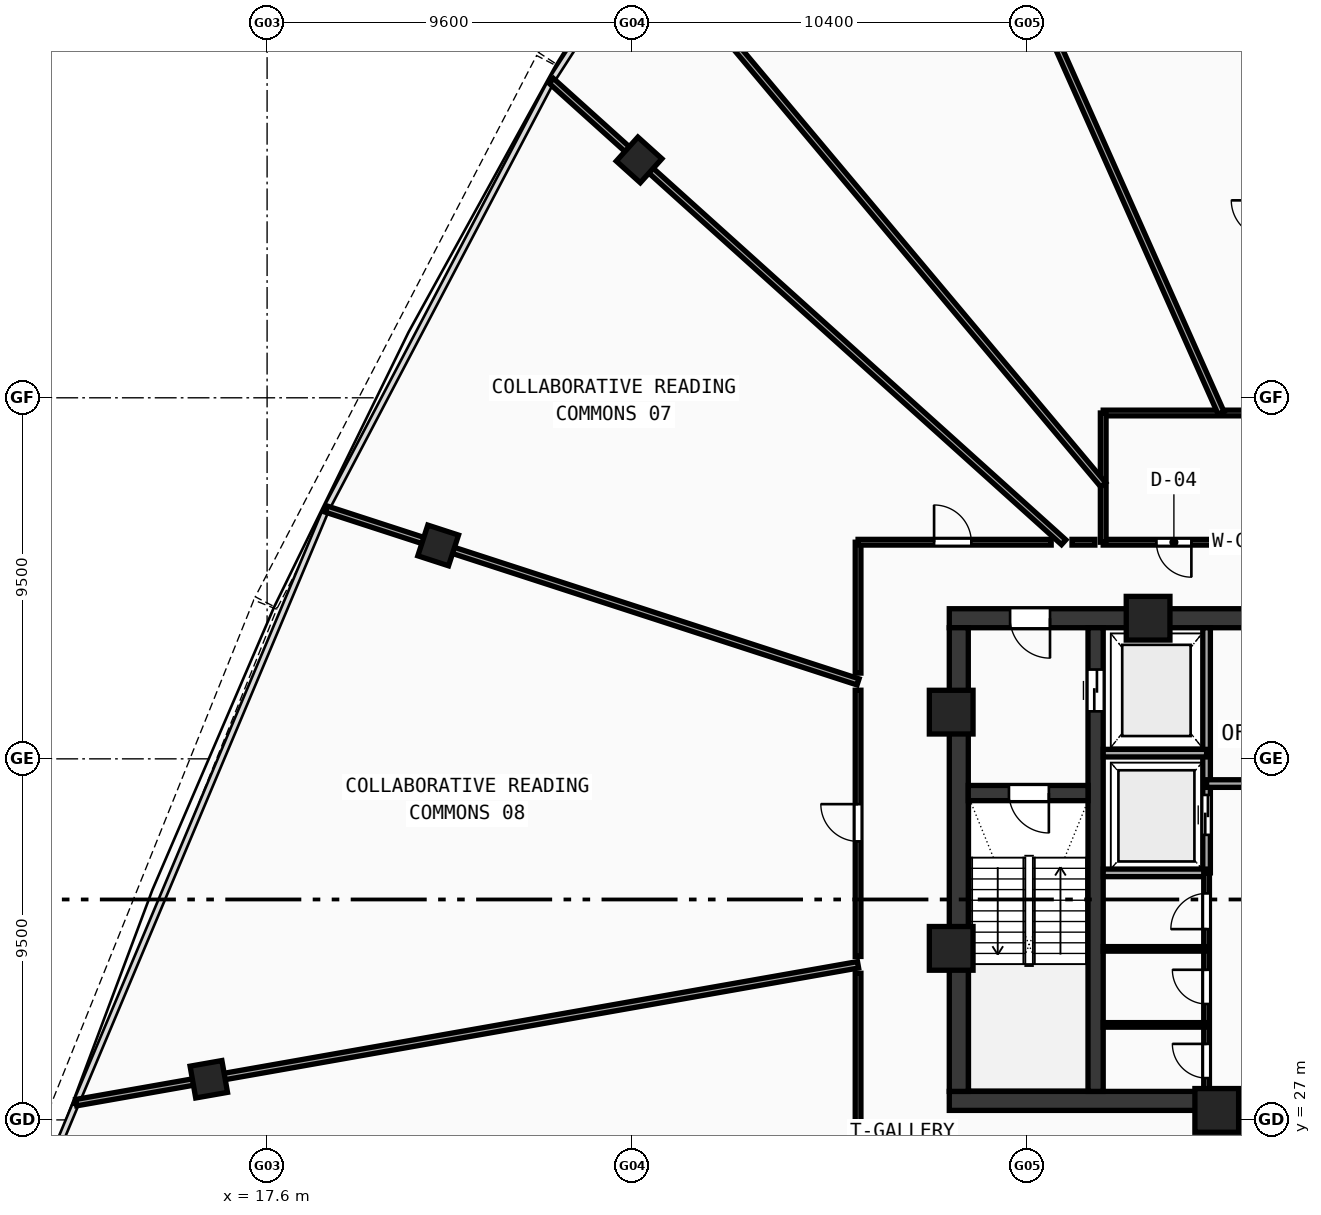
"""IFC4 building model, lengths in metres.
Left out: names, types, materials, properties, quantities, classifications, styles, units other than length and angle.
Written with IfcOpenShell. Run it as: python <this file> out.ifc"""

import sys

from ifc_helpers import new_model, si_unit, direction, frame, frame_2d, origin, origin_with_axes, origin_2d, place, context, subcontext, project, spatial, rectangle, hollow_rectangle, extrude, source, transform, mapped, element, fill, save


model = new_model("IFC4")
c1 = context("Model", 3, precision=1e-05, world=origin(), true_north=direction((0.0, 1.0)))
c2 = subcontext(c1, "Body", "Model", "MODEL_VIEW")
j1 = project(units=[si_unit("LENGTHUNIT", "METRE"), si_unit("PLANEANGLEUNIT", "RADIAN")], contexts=[c1])
p1 = place(None, origin())
s1 = spatial("IfcSite", under=j1, at=p1, CompositionType="ELEMENT")
p2 = place(p1, origin())
s2 = spatial("IfcBuilding", under=s1, at=p2, CompositionType="ELEMENT")
p3 = place(p2, frame((0.0, 0.0, 233.34)))
s3 = spatial("IfcBuildingStorey", under=s2, at=p3, CompositionType="ELEMENT", Elevation=233.34)
p4 = place(p3, frame((35.55, 27.5, 0.0), z_axis=(0.0, 0.0, 1.0), x_axis=(1.0, 0.0, 0.0)))
e1 = element("IfcWall", 1, at=p4, inside=s3, PredefinedType="SHEAR", context=c2, shape_type="SweptSolid", body=[
    extrude(rectangle(XDim=24.9, YDim=0.5, at=frame_2d((12.45, 0.0))), origin(), (0.0, 0.0, 1.0), 3.47),
])
p5 = place(p3, frame((35.55, 40.2, 0.0), z_axis=(0.0, 0.0, 1.0), x_axis=(1.0, 0.0, 0.0)))
e2 = element("IfcWall", 2, at=p5, inside=s3, PredefinedType="SHEAR", context=c2, shape_type="SweptSolid", body=[
    extrude(rectangle(XDim=11.25, YDim=0.5, at=frame_2d((5.625, 0.0))), origin(), (0.0, 0.0, 1.0), 3.47),
])
p6 = place(p5, frame((1.6, 0.0, 0.0)))
e3 = element("IfcOpeningElement", 3, at=p6, cuts=e2, PredefinedType="OPENING", context=c2, shape_type="SweptSolid", body=[
    extrude(rectangle(XDim=1.05, YDim=2.1, at=frame_2d((0.525, 1.05))), frame((0.0, 0.26, 0.0), z_axis=(0.0, -1.0, 0.0), x_axis=(1.0, 0.0, 0.0)), (0.0, 0.0, 1.0), 0.52),
])
p7 = place(p3, frame((35.8, 27.75, 0.0), z_axis=(0.0, 0.0, 1.0), x_axis=(0.0, 1.0, 0.0)))
e4 = element("IfcWall", 4, at=p7, inside=s3, PredefinedType="SHEAR", context=c2, shape_type="SweptSolid", body=[
    extrude(rectangle(XDim=12.2, YDim=0.5, at=frame_2d((6.1, 0.0))), origin(), (0.0, 0.0, 1.0), 3.47),
])
p8 = place(p3, frame((39.4, 27.75, 0.0), z_axis=(0.0, 0.0, 1.0), x_axis=(0.0, 1.0, 0.0)))
e5 = element("IfcWall", 5, at=p8, inside=s3, PredefinedType="SHEAR", context=c2, shape_type="SweptSolid", body=[
    extrude(rectangle(XDim=12.2, YDim=0.4, at=frame_2d((6.1, 0.0))), origin(), (0.0, 0.0, 1.0), 3.47),
])
p9 = place(p8, frame((10.0, 0.0, 0.0)))
e6 = element("IfcOpeningElement", 6, at=p9, cuts=e5, PredefinedType="OPENING", context=c2, shape_type="SweptSolid", body=[
    extrude(rectangle(XDim=1.1, YDim=2.1, at=frame_2d((0.55, 1.05))), frame((0.0, 0.21, 0.0), z_axis=(0.0, -1.0, 0.0), x_axis=(1.0, 0.0, 0.0)), (0.0, 0.0, 1.0), 0.42),
])
p10 = place(p3, frame((36.05, 35.6, 0.0), z_axis=(0.0, 0.0, 1.0), x_axis=(1.0, 0.0, 0.0)))
e7 = element("IfcWall", 7, at=p10, inside=s3, PredefinedType="SHEAR", context=c2, shape_type="SweptSolid", body=[
    extrude(rectangle(XDim=3.15, YDim=0.4, at=frame_2d((1.575, 0.0))), origin(), (0.0, 0.0, 1.0), 3.47),
])
p11 = place(p10, frame((1.07, 0.0, 0.0)))
e8 = element("IfcOpeningElement", 8, at=p11, cuts=e7, PredefinedType="OPENING", context=c2, shape_type="SweptSolid", body=[
    extrude(rectangle(XDim=1.05, YDim=2.1, at=frame_2d((0.525, 1.05))), frame((0.0, 0.21, 0.0), z_axis=(0.0, -1.0, 0.0), x_axis=(1.0, 0.0, 0.0)), (0.0, 0.0, 1.0), 0.42),
])
m1 = source(origin(), c2, "Body", "SweptSolid", [
    extrude(hollow_rectangle(XDim=1.15, YDim=1.15, WallThickness=0.048, at=origin_2d()), origin(), (0.0, 0.0, 1.0), 3.73),
])
for number, where, z_axis, x_axis in (
    (9, (42.588, 27.25, -0.26), (0.0, 0.0, 1.0), (1.0, 0.0, 0.0)),
    (10, (40.781, 40.2, -0.26), (0.0, 0.0, 1.0), (1.0, 0.0, 0.0)),
    (11, (35.6, 37.729, -0.26), (0.0, 0.0, 1.0), (1.0, 0.0, 0.0)),
    (12, (35.6, 31.513, -0.26), (0.0, 0.0, 1.0), (1.0, 0.0, 0.0)),
):
    element("IfcColumn", number, at=place(p3, frame(where, z_axis=z_axis, x_axis=x_axis)), inside=s3, PredefinedType="COLUMN", context=c2, shape_type="MappedRepresentation", body=[
        mapped(m1, transform((0.0, 0.0, 0.0), scale=1.0)),
    ])
m2 = source(origin(), c2, "Body", "SweptSolid", [
    extrude(hollow_rectangle(XDim=0.85, YDim=0.85, WallThickness=0.034, at=origin_2d()), origin(), (0.0, 0.0, 1.0), 3.73),
])
for number, where, z_axis, x_axis in (
    (13, (27.388, 52.259, -0.26), (0.0, 0.0, 1.0), (-0.669, -0.743, 0.0)),
    (14, (22.102, 42.115, -0.26), (0.0, 0.0, 1.0), (-0.309, -0.951, 0.0)),
    (15, (16.066, 28.069, -0.26), (0.0, 0.0, 1.0), (0.174, -0.985, 0.0)),
):
    element("IfcColumn", number, at=place(p3, frame(where, z_axis=z_axis, x_axis=x_axis)), inside=s3, PredefinedType="COLUMN", context=c2, shape_type="MappedRepresentation", body=[
        mapped(m2, transform((0.0, 0.0, 0.0), scale=1.0)),
    ])
p12 = place(p3, frame((42.32, 33.5, 0.0), z_axis=(0.0, 0.0, 1.0), x_axis=(0.0, 1.0, 0.0)))
e16 = element("IfcWall", 16, at=p12, inside=s3, PredefinedType="SOLIDWALL", context=c2, shape_type="SweptSolid", body=[
    extrude(rectangle(XDim=6.45, YDim=0.2, at=frame_2d((3.225, 0.0))), origin(), (0.0, 0.0, 1.0), 3.47),
])
p13 = place(p12, frame((1.0, 0.0, 0.0)))
e17 = element("IfcOpeningElement", 17, at=p13, cuts=e16, PredefinedType="OPENING", context=c2, shape_type="SweptSolid", body=[
    extrude(rectangle(XDim=1.05, YDim=2.1, at=frame_2d((0.525, 1.05))), frame((0.0, 0.11, 0.0), z_axis=(0.0, -1.0, 0.0), x_axis=(1.0, 0.0, 0.0)), (0.0, 0.0, 1.0), 0.22),
])
for number, where, z_axis, x_axis in (
    (18, (39.6, 36.65, 0.0), (0.0, 0.0, 1.0), (1.0, 0.0, 0.0)),
    (19, (39.6, 33.5, 0.0), (0.0, 0.0, 1.0), (1.0, 0.0, 0.0)),
):
    element("IfcWall", number, at=place(p3, frame(where, z_axis=z_axis, x_axis=x_axis)), inside=s3, PredefinedType="SOLIDWALL", context=c2, shape_type="SweptSolid", body=[
        extrude(rectangle(XDim=2.72, YDim=0.2, at=frame_2d((1.36, 0.0))), origin(), (0.0, 0.0, 1.0), 3.47),
    ])
p14 = place(p3, frame((42.32, 35.85, 0.0), z_axis=(0.0, 0.0, 1.0), x_axis=(1.0, 0.0, 0.0)))
e20 = element("IfcWall", 20, at=p14, inside=s3, PredefinedType="SOLIDWALL", context=c2, shape_type="SweptSolid", body=[
    extrude(rectangle(XDim=4.73, YDim=0.2, at=frame_2d((2.365, 0.0))), origin(), (0.0, 0.0, 1.0), 3.47),
])
p15 = place(p14, frame((1.8, 0.0, 0.0)))
e21 = element("IfcOpeningElement", 21, at=p15, cuts=e20, PredefinedType="OPENING", context=c2, shape_type="SweptSolid", body=[
    extrude(rectangle(XDim=0.9, YDim=2.1, at=frame_2d((0.45, 1.05))), frame((0.0, 0.11, 0.0), z_axis=(0.0, -1.0, 0.0), x_axis=(1.0, 0.0, 0.0)), (0.0, 0.0, 1.0), 0.22),
])
p16 = place(p3, frame((42.32, 27.6, 0.0), z_axis=(0.0, 0.0, 1.0), x_axis=(0.0, 1.0, 0.0)))
e22 = element("IfcWall", 22, at=p16, inside=s3, PredefinedType="PARTITIONING", context=c2, shape_type="SweptSolid", body=[
    extrude(rectangle(XDim=5.9, YDim=0.15, at=frame_2d((2.95, 0.0))), origin(), (0.0, 0.0, 1.0), 3.47),
])
p17 = place(p16, frame((0.5, 0.0, 0.0)))
e23 = element("IfcOpeningElement", 23, at=p17, cuts=e22, PredefinedType="OPENING", context=c2, shape_type="SweptSolid", body=[
    extrude(rectangle(XDim=0.9, YDim=2.1, at=frame_2d((0.45, 1.05))), frame((0.0, 0.085, 0.0), z_axis=(0.0, -1.0, 0.0), x_axis=(1.0, 0.0, 0.0)), (0.0, 0.0, 1.0), 0.17),
])
p18 = place(p16, frame((2.45, 0.0, 0.0)))
e24 = element("IfcOpeningElement", 24, at=p18, cuts=e22, PredefinedType="OPENING", context=c2, shape_type="SweptSolid", body=[
    extrude(rectangle(XDim=0.9, YDim=2.1, at=frame_2d((0.45, 1.05))), frame((0.0, 0.085, 0.0), z_axis=(0.0, -1.0, 0.0), x_axis=(1.0, 0.0, 0.0)), (0.0, 0.0, 1.0), 0.17),
])
p19 = place(p16, frame((4.42, 0.0, 0.0)))
e25 = element("IfcOpeningElement", 25, at=p19, cuts=e22, PredefinedType="OPENING", context=c2, shape_type="SweptSolid", body=[
    extrude(rectangle(XDim=0.94, YDim=2.1, at=frame_2d((0.47, 1.05))), frame((0.0, 0.085, 0.0), z_axis=(0.0, -1.0, 0.0), x_axis=(1.0, 0.0, 0.0)), (0.0, 0.0, 1.0), 0.17),
])
for number, where, z_axis, x_axis in (
    (26, (39.6, 29.5, 0.0), (0.0, 0.0, 1.0), (1.0, 0.0, 0.0)),
    (27, (39.6, 31.5, 0.0), (0.0, 0.0, 1.0), (1.0, 0.0, 0.0)),
):
    element("IfcWall", number, at=place(p3, frame(where, z_axis=z_axis, x_axis=x_axis)), inside=s3, PredefinedType="PARTITIONING", context=c2, shape_type="SweptSolid", body=[
        extrude(rectangle(XDim=2.72, YDim=0.12, at=frame_2d((1.36, 0.0))), origin(), (0.0, 0.0, 1.0), 3.47),
    ])
p20 = place(p3, frame((39.6, 42.2, 0.0), z_axis=(0.0, 0.0, 1.0), x_axis=(1.0, 0.0, 0.0)))
e28 = element("IfcWall", 28, at=p20, inside=s3, PredefinedType="PARTITIONING", context=c2, shape_type="SweptSolid", body=[
    extrude(rectangle(XDim=4.35, YDim=0.15, at=frame_2d((2.175, 0.0))), origin(), (0.0, 0.0, 1.0), 3.47),
])
p21 = place(p20, frame((1.4, 0.0, 0.0)))
e29 = element("IfcOpeningElement", 29, at=p21, cuts=e28, PredefinedType="OPENING", context=c2, shape_type="SweptSolid", body=[
    extrude(rectangle(XDim=0.92, YDim=2.1, at=frame_2d((0.46, 1.05))), frame((0.0, 0.085, 0.0), z_axis=(0.0, -1.0, 0.0), x_axis=(1.0, 0.0, 0.0)), (0.0, 0.0, 1.0), 0.17),
])
p22 = place(p3, frame((39.6, 45.6, 0.0), z_axis=(0.0, 0.0, 1.0), x_axis=(1.0, 0.0, 0.0)))
e30 = element("IfcWall", 30, at=p22, inside=s3, PredefinedType="PARTITIONING", context=c2, shape_type="SweptSolid", body=[
    extrude(rectangle(XDim=4.35, YDim=0.15, at=frame_2d((2.175, 0.0))), origin(), (0.0, 0.0, 1.0), 2.82),
])
p23 = place(p3, frame((39.6, 42.2, 0.0), z_axis=(0.0, 0.0, 1.0), x_axis=(0.0, 1.0, 0.0)))
e31 = element("IfcWall", 31, at=p23, inside=s3, PredefinedType="PARTITIONING", context=c2, shape_type="SweptSolid", body=[
    extrude(rectangle(XDim=3.4, YDim=0.15, at=frame_2d((1.7, 0.0))), origin(), (0.0, 0.0, 1.0), 3.47),
])
p24 = place(p3, frame((42.702, 45.6, 0.0), z_axis=(0.0, 0.0, 1.0), x_axis=(-0.406743256781, 0.913542513003, 0.0)))
e32 = element("IfcWall", 32, at=p24, inside=s3, PredefinedType="PARTITIONING", context=c2, shape_type="SweptSolid", body=[
    extrude(rectangle(XDim=23.368, YDim=0.17, at=frame_2d((11.684, 0.0))), origin(), (0.0, 0.0, 1.0), 2.82),
])
p25 = place(p3, frame((39.6, 43.711, 0.0), z_axis=(0.0, 0.0, 1.0), x_axis=(-0.642791950905, 0.766040800383, 0.0)))
e33 = element("IfcWall", 33, at=p25, inside=s3, PredefinedType="PARTITIONING", context=c2, shape_type="SweptSolid", body=[
    extrude(rectangle(XDim=18.806, YDim=0.17, at=frame_2d((9.403, 0.0))), origin(), (0.0, 0.0, 1.0), 2.82),
])
p26 = place(p3, frame((38.56, 42.2, 0.0), z_axis=(0.0, 0.0, 1.0), x_axis=(-0.743147575456, 0.669127552185, 0.0)))
e34 = element("IfcWall", 34, at=p26, inside=s3, PredefinedType="PARTITIONING", context=c2, shape_type="SweptSolid", body=[
    extrude(rectangle(XDim=18.141, YDim=0.17, at=frame_2d((9.07, 0.0))), origin(), (0.0, 0.0, 1.0), 2.82),
])
p27 = place(p3, frame((33.15, 38.525, 0.0), z_axis=(0.0, 0.0, 1.0), x_axis=(-0.951058452106, 0.309011036497, 0.0)))
e35 = element("IfcWall", 35, at=p27, inside=s3, PredefinedType="PARTITIONING", context=c2, shape_type="SweptSolid", body=[
    extrude(rectangle(XDim=14.714, YDim=0.17, at=frame_2d((7.357, 0.0))), origin(), (0.0, 0.0, 1.0), 2.82),
])
p28 = place(p3, frame((33.15, 31.082, 0.0), z_axis=(0.0, 0.0, 1.0), x_axis=(-0.984808138799, -0.17364598975, 0.0)))
e36 = element("IfcWall", 36, at=p28, inside=s3, PredefinedType="PARTITIONING", context=c2, shape_type="SweptSolid", body=[
    extrude(rectangle(XDim=20.89, YDim=0.17, at=frame_2d((10.445, 0.0))), origin(), (0.0, 0.0, 1.0), 2.82),
])
p29 = place(p3, frame((33.15, 24.9, 0.0), z_axis=(0.0, 0.0, 1.0), x_axis=(0.0, 1.0, 0.0)))
e37 = element("IfcWall", 37, at=p29, inside=s3, PredefinedType="PARTITIONING", context=c2, shape_type="SweptSolid", body=[
    extrude(rectangle(XDim=5.958, YDim=0.15, at=frame_2d((2.979, 0.0))), origin(), (0.0, 0.0, 1.0), 3.12),
])
p30 = place(p3, frame((33.15, 31.301, 0.0), z_axis=(0.0, 0.0, 1.0), x_axis=(0.0, 1.0, 0.0)))
e38 = element("IfcWall", 38, at=p30, inside=s3, PredefinedType="PARTITIONING", context=c2, shape_type="SweptSolid", body=[
    extrude(rectangle(XDim=7.004, YDim=0.15, at=frame_2d((3.502, 0.0))), origin(), (0.0, 0.0, 1.0), 3.47),
])
p31 = place(p30, frame((3.027, 0.0, 0.0)))
e39 = element("IfcOpeningElement", 39, at=p31, cuts=e38, PredefinedType="OPENING", context=c2, shape_type="SweptSolid", body=[
    extrude(rectangle(XDim=0.98, YDim=2.12, at=frame_2d((0.49, 1.06))), frame((0.0, 0.085, 0.0), z_axis=(0.0, -1.0, 0.0), x_axis=(1.0, 0.0, 0.0)), (0.0, 0.0, 1.0), 0.17),
])
p32 = place(p3, frame((33.15, 38.756, 0.0), z_axis=(0.0, 0.0, 1.0), x_axis=(0.0, 1.0, 0.0)))
e40 = element("IfcWall", 40, at=p32, inside=s3, PredefinedType="PARTITIONING", context=c2, shape_type="SweptSolid", body=[
    extrude(rectangle(XDim=3.444, YDim=0.15, at=frame_2d((1.722, 0.0))), origin(), (0.0, 0.0, 1.0), 3.12),
])
p33 = place(p3, frame((33.15, 42.2, 0.0), z_axis=(0.0, 0.0, 1.0), x_axis=(1.0, 0.0, 0.0)))
e41 = element("IfcWall", 41, at=p33, inside=s3, PredefinedType="PARTITIONING", context=c2, shape_type="SweptSolid", body=[
    extrude(rectangle(XDim=5.081, YDim=0.15, at=frame_2d((2.541, 0.0))), origin(), (0.0, 0.0, 1.0), 3.12),
])
p34 = place(p33, frame((2.0, 0.0, 0.0)))
e42 = element("IfcOpeningElement", 42, at=p34, cuts=e41, PredefinedType="OPENING", context=c2, shape_type="SweptSolid", body=[
    extrude(rectangle(XDim=0.98, YDim=2.12, at=frame_2d((0.49, 1.06))), frame((0.0, 0.085, 0.0), z_axis=(0.0, -1.0, 0.0), x_axis=(1.0, 0.0, 0.0)), (0.0, 0.0, 1.0), 0.17),
])
p35 = place(p3, frame((38.78, 42.2, 0.0), z_axis=(0.0, 0.0, 1.0), x_axis=(1.0, 0.0, 0.0)))
e43 = element("IfcWall", 43, at=p35, inside=s3, PredefinedType="PARTITIONING", context=c2, shape_type="SweptSolid", body=[
    extrude(rectangle(XDim=0.6, YDim=0.15, at=frame_2d((0.3, 0.0))), origin(), (0.0, 0.0, 1.0), 2.82),
])
m3 = source(origin(), c2, "Body", "SweptSolid", [
    extrude(rectangle(XDim=1.05, YDim=2.1, at=frame_2d((0.525, 1.05))), frame((0.0, 0.025, 0.0), z_axis=(0.0, -1.0, 0.0), x_axis=(1.0, 0.0, 0.0)), (0.0, 0.0, 1.0), 0.05),
])
p36 = place(p11, frame((1.05, 0.0, 0.0), z_axis=(0.0, 0.0, 1.0), x_axis=(-1.0, 0.0, 0.0)))
e44 = element("IfcDoor", 44, at=p36, inside=s3, OperationType="SINGLE_SWING_LEFT", PredefinedType="DOOR", context=c2, shape_type="MappedRepresentation", body=[
    mapped(m3, transform((0.0, 0.0, 0.0), scale=1.0)),
])
fill(e8, e44)
p37 = place(p6, frame((1.05, 0.0, 0.0), z_axis=(0.0, 0.0, 1.0), x_axis=(-1.0, 0.0, 0.0)))
e45 = element("IfcDoor", 45, at=p37, inside=s3, OperationType="SINGLE_SWING_LEFT", PredefinedType="DOOR", context=c2, shape_type="MappedRepresentation", body=[
    mapped(m3, transform((0.0, 0.0, 0.0), scale=1.0)),
])
fill(e3, e45)
m4 = source(origin(), c2, "Body", "SweptSolid", [
    extrude(rectangle(XDim=1.1, YDim=2.1, at=frame_2d((0.55, 1.05))), frame((0.0, 0.025, 0.0), z_axis=(0.0, -1.0, 0.0), x_axis=(1.0, 0.0, 0.0)), (0.0, 0.0, 1.0), 0.05),
])
p38 = place(p9, frame((1.1, 0.0, 0.0), z_axis=(0.0, 0.0, 1.0), x_axis=(-1.0, 0.0, 0.0)))
e46 = element("IfcDoor", 46, at=p38, inside=s3, OperationType="DOUBLE_DOOR_SLIDING", PredefinedType="DOOR", context=c2, shape_type="MappedRepresentation", body=[
    mapped(m4, transform((0.0, 0.0, 0.0), scale=1.0)),
])
fill(e6, e46)
p39 = place(p13, origin_with_axes())
e47 = element("IfcDoor", 47, at=p39, inside=s3, OperationType="DOUBLE_DOOR_SLIDING", PredefinedType="DOOR", context=c2, shape_type="MappedRepresentation", body=[
    mapped(m3, transform((0.0, 0.0, 0.0), scale=1.0)),
])
fill(e17, e47)
m5 = source(origin(), c2, "Body", "SweptSolid", [
    extrude(rectangle(XDim=0.9, YDim=2.1, at=frame_2d((0.45, 1.05))), frame((0.0, 0.025, 0.0), z_axis=(0.0, -1.0, 0.0), x_axis=(1.0, 0.0, 0.0)), (0.0, 0.0, 1.0), 0.05),
])
p40 = place(p17, origin_with_axes())
e48 = element("IfcDoor", 48, at=p40, inside=s3, OperationType="SINGLE_SWING_RIGHT", PredefinedType="DOOR", context=c2, shape_type="MappedRepresentation", body=[
    mapped(m5, transform((0.0, 0.0, 0.0), scale=1.0)),
])
fill(e23, e48)
p41 = place(p18, origin_with_axes())
e49 = element("IfcDoor", 49, at=p41, inside=s3, OperationType="SINGLE_SWING_RIGHT", PredefinedType="DOOR", context=c2, shape_type="MappedRepresentation", body=[
    mapped(m5, transform((0.0, 0.0, 0.0), scale=1.0)),
])
fill(e24, e49)
m6 = source(origin(), c2, "Body", "SweptSolid", [
    extrude(rectangle(XDim=0.94, YDim=2.1, at=frame_2d((0.47, 1.05))), frame((0.0, 0.025, 0.0), z_axis=(0.0, -1.0, 0.0), x_axis=(1.0, 0.0, 0.0)), (0.0, 0.0, 1.0), 0.05),
])
p42 = place(p19, origin_with_axes())
e50 = element("IfcDoor", 50, at=p42, inside=s3, OperationType="SINGLE_SWING_LEFT", PredefinedType="DOOR", context=c2, shape_type="MappedRepresentation", body=[
    mapped(m6, transform((0.0, 0.0, 0.0), scale=1.0)),
])
fill(e25, e50)
m7 = source(origin(), c2, "Body", "SweptSolid", [
    extrude(rectangle(XDim=0.92, YDim=2.1, at=frame_2d((0.46, 1.05))), frame((0.0, 0.025, 0.0), z_axis=(0.0, -1.0, 0.0), x_axis=(1.0, 0.0, 0.0)), (0.0, 0.0, 1.0), 0.05),
])
p43 = place(p21, frame((0.92, 0.0, 0.0), z_axis=(0.0, 0.0, 1.0), x_axis=(-1.0, 0.0, 0.0)))
e51 = element("IfcDoor", 51, at=p43, inside=s3, OperationType="SINGLE_SWING_LEFT", PredefinedType="DOOR", context=c2, shape_type="MappedRepresentation", body=[
    mapped(m7, transform((0.0, 0.0, 0.0), scale=1.0)),
])
fill(e29, e51)
m8 = source(origin(), c2, "Body", "SweptSolid", [
    extrude(rectangle(XDim=0.98, YDim=2.12, at=frame_2d((0.49, 1.06))), frame((0.0, 0.025, 0.0), z_axis=(0.0, -1.0, 0.0), x_axis=(1.0, 0.0, 0.0)), (0.0, 0.0, 1.0), 0.05),
])
p44 = place(p34, origin_with_axes())
e52 = element("IfcDoor", 52, at=p44, inside=s3, OperationType="SINGLE_SWING_LEFT", PredefinedType="DOOR", context=c2, shape_type="MappedRepresentation", body=[
    mapped(m8, transform((0.0, 0.0, 0.0), scale=1.0)),
])
fill(e42, e52)
p45 = place(p31, origin_with_axes())
e53 = element("IfcDoor", 53, at=p45, inside=s3, OperationType="SINGLE_SWING_RIGHT", PredefinedType="DOOR", context=c2, shape_type="MappedRepresentation", body=[
    mapped(m8, transform((0.0, 0.0, 0.0), scale=1.0)),
])
fill(e39, e53)
save(model, sys.argv[1])
